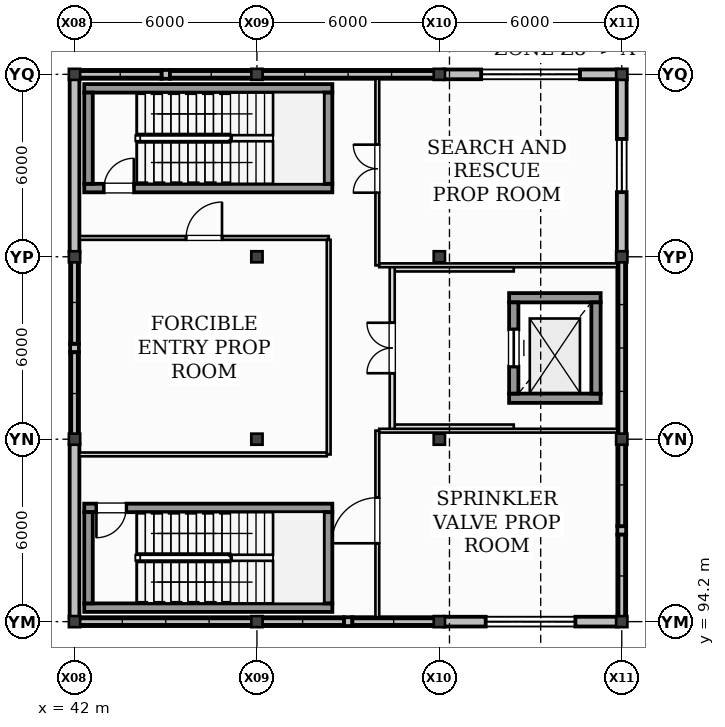
"""IFC4 building model, lengths in metres.
Left out: names, types, materials, properties, quantities, classifications, styles, units other than length and angle.
Written with IfcOpenShell. Run it as: python <this file> out.ifc"""

import sys

from ifc_helpers import new_model, si_unit, direction, frame, frame_2d, origin, origin_2d, place, context, subcontext, project, spatial, rectangle, i_section, extrude, element, fill, save


model = new_model("IFC4")
c1 = context("Model", 3, precision=1e-05, world=origin(), true_north=direction((0.0, 1.0)))
c2 = subcontext(c1, "Body", "Model", "MODEL_VIEW")
j1 = project(units=[si_unit("LENGTHUNIT", "METRE"), si_unit("PLANEANGLEUNIT", "RADIAN")], contexts=[c1])
p1 = place(None, origin())
s1 = spatial("IfcSite", under=j1, at=p1, CompositionType="ELEMENT")
p2 = place(p1, origin())
s2 = spatial("IfcBuilding", under=s1, at=p2, CompositionType="ELEMENT")
p3 = place(p2, frame((0.0, 0.0, 6.0)))
s3 = spatial("IfcBuildingStorey", under=s2, at=p3, CompositionType="ELEMENT", Elevation=6.0)
for number, where, z_axis, x_axis in (
    (1, (42.0, 94.2, 0.0), (0.0, 0.0, 1.0), (1.0, 0.0, 0.0)),
    (2, (42.0, 100.2, 0.0), (0.0, 0.0, 1.0), (1.0, 0.0, 0.0)),
    (3, (42.0, 106.2, 0.0), (0.0, 0.0, 1.0), (1.0, 0.0, 0.0)),
    (4, (42.0, 112.2, 0.0), (0.0, 0.0, 1.0), (1.0, 0.0, 0.0)),
    (5, (48.0, 94.2, 0.0), (0.0, 0.0, 1.0), (1.0, 0.0, 0.0)),
    (6, (48.0, 100.2, 0.0), (0.0, 0.0, 1.0), (1.0, 0.0, 0.0)),
    (7, (48.0, 106.2, 0.0), (0.0, 0.0, 1.0), (1.0, 0.0, 0.0)),
    (8, (48.0, 112.2, 0.0), (0.0, 0.0, 1.0), (1.0, 0.0, 0.0)),
    (9, (54.0, 94.2, 0.0), (0.0, 0.0, 1.0), (1.0, 0.0, 0.0)),
    (10, (54.0, 100.2, 0.0), (0.0, 0.0, 1.0), (1.0, 0.0, 0.0)),
    (11, (54.0, 106.2, 0.0), (0.0, 0.0, 1.0), (1.0, 0.0, 0.0)),
    (12, (54.0, 112.2, 0.0), (0.0, 0.0, 1.0), (1.0, 0.0, 0.0)),
    (13, (60.0, 94.2, 0.0), (0.0, 0.0, 1.0), (1.0, 0.0, 0.0)),
    (14, (60.0, 100.2, 0.0), (0.0, 0.0, 1.0), (1.0, 0.0, 0.0)),
    (15, (60.0, 106.2, 0.0), (0.0, 0.0, 1.0), (1.0, 0.0, 0.0)),
    (16, (60.0, 112.2, 0.0), (0.0, 0.0, 1.0), (1.0, 0.0, 0.0)),
):
    element("IfcColumn", number, at=place(p3, frame(where, z_axis=z_axis, x_axis=x_axis)), inside=s3, PredefinedType="COLUMN", context=c2, shape_type="SweptSolid", body=[
        extrude(i_section(OverallWidth=0.371, OverallDepth=0.364, WebThickness=0.013, FlangeThickness=0.022, at=origin_2d()), origin(), (0.0, 0.0, 1.0), 4.0),
    ])
p4 = place(p3, frame((42.145, 94.2, 0.0), z_axis=(0.0, 0.0, 1.0), x_axis=(1.0, 0.0, 0.0)))
e17 = element("IfcWall", 17, at=p4, inside=s3, PredefinedType="STANDARD", context=c2, shape_type="SweptSolid", body=[
    extrude(rectangle(XDim=5.71, YDim=0.29, at=frame_2d((2.855, 0.0))), origin(), (0.0, 0.0, 1.0), 0.8),
])
p5 = place(p3, frame((50.86, 94.2, 0.0), z_axis=(0.0, 0.0, 1.0), x_axis=(1.0, 0.0, 0.0)))
e18 = element("IfcWall", 18, at=p5, inside=s3, PredefinedType="STANDARD", context=c2, shape_type="SweptSolid", body=[
    extrude(rectangle(XDim=0.28, YDim=0.29, at=frame_2d((0.14, 0.0))), origin(), (0.0, 0.0, 1.0), 3.153),
])
p6 = place(p3, frame((48.145, 94.2, 0.0), z_axis=(0.0, 0.0, 1.0), x_axis=(1.0, 0.0, 0.0)))
e19 = element("IfcWall", 19, at=p6, inside=s3, PredefinedType="STANDARD", context=c2, shape_type="SweptSolid", body=[
    extrude(rectangle(XDim=2.715, YDim=0.29, at=frame_2d((1.357, 0.0))), origin(), (0.0, 0.0, 1.0), 0.92),
])
p7 = place(p3, frame((51.14, 94.2, 0.0), z_axis=(0.0, 0.0, 1.0), x_axis=(1.0, 0.0, 0.0)))
e20 = element("IfcWall", 20, at=p7, inside=s3, PredefinedType="STANDARD", context=c2, shape_type="SweptSolid", body=[
    extrude(rectangle(XDim=2.715, YDim=0.29, at=frame_2d((1.357, 0.0))), origin(), (0.0, 0.0, 1.0), 0.32),
])
p8 = place(p3, frame((54.145, 94.2, 0.0), z_axis=(0.0, 0.0, 1.0), x_axis=(1.0, 0.0, 0.0)))
e21 = element("IfcWall", 21, at=p8, inside=s3, PredefinedType="STANDARD", context=c2, shape_type="SweptSolid", body=[
    extrude(rectangle(XDim=5.71, YDim=0.32, at=frame_2d((2.855, 0.0))), origin(), (0.0, 0.0, 1.0), 3.153),
])
p9 = place(p8, frame((1.38, 0.0, 1.0)))
e22 = element("IfcOpeningElement", 22, at=p9, cuts=e21, PredefinedType="OPENING", context=c2, shape_type="SweptSolid", body=[
    extrude(rectangle(XDim=2.95, YDim=1.55, at=frame_2d((1.475, 0.775))), frame((0.0, 0.17, 0.0), z_axis=(0.0, -1.0, 0.0), x_axis=(1.0, 0.0, 0.0)), (0.0, 0.0, 1.0), 0.34),
])
p10 = place(p3, frame((45.14, 112.2, 0.0), z_axis=(0.0, 0.0, 1.0), x_axis=(-1.0, 0.0, 0.0)))
e23 = element("IfcWall", 23, at=p10, inside=s3, PredefinedType="STANDARD", context=c2, shape_type="SweptSolid", body=[
    extrude(rectangle(XDim=0.28, YDim=0.29, at=frame_2d((0.14, 0.0))), origin(), (0.0, 0.0, 1.0), 3.153),
])
p11 = place(p3, frame((47.855, 112.2, 0.0), z_axis=(0.0, 0.0, 1.0), x_axis=(-1.0, 0.0, 0.0)))
e24 = element("IfcWall", 24, at=p11, inside=s3, PredefinedType="STANDARD", context=c2, shape_type="SweptSolid", body=[
    extrude(rectangle(XDim=2.715, YDim=0.29, at=frame_2d((1.357, 0.0))), origin(), (0.0, 0.0, 1.0), 0.44),
])
p12 = place(p3, frame((44.86, 112.2, 0.0), z_axis=(0.0, 0.0, 1.0), x_axis=(-1.0, 0.0, 0.0)))
e25 = element("IfcWall", 25, at=p12, inside=s3, PredefinedType="STANDARD", context=c2, shape_type="SweptSolid", body=[
    extrude(rectangle(XDim=2.715, YDim=0.29, at=frame_2d((1.357, 0.0))), origin(), (0.0, 0.0, 1.0), 0.56),
])
p13 = place(p3, frame((53.855, 112.2, 0.0), z_axis=(0.0, 0.0, 1.0), x_axis=(-1.0, 0.0, 0.0)))
e26 = element("IfcWall", 26, at=p13, inside=s3, PredefinedType="STANDARD", context=c2, shape_type="SweptSolid", body=[
    extrude(rectangle(XDim=5.71, YDim=0.29, at=frame_2d((2.855, 0.0))), origin(), (0.0, 0.0, 1.0), 0.68),
])
p14 = place(p3, frame((59.855, 112.2, 0.0), z_axis=(0.0, 0.0, 1.0), x_axis=(-1.0, 0.0, 0.0)))
e27 = element("IfcWall", 27, at=p14, inside=s3, PredefinedType="STANDARD", context=c2, shape_type="SweptSolid", body=[
    extrude(rectangle(XDim=5.71, YDim=0.32, at=frame_2d((2.855, 0.0))), origin(), (0.0, 0.0, 1.0), 3.153),
])
p15 = place(p14, frame((1.23, 0.0, 1.0)))
e28 = element("IfcOpeningElement", 28, at=p15, cuts=e27, PredefinedType="OPENING", context=c2, shape_type="SweptSolid", body=[
    extrude(rectangle(XDim=3.25, YDim=1.55, at=frame_2d((1.625, 0.775))), frame((0.0, 0.17, 0.0), z_axis=(0.0, -1.0, 0.0), x_axis=(1.0, 0.0, 0.0)), (0.0, 0.0, 1.0), 0.34),
])
p16 = place(p3, frame((42.0, 100.055, 0.0), z_axis=(0.0, 0.0, 1.0), x_axis=(0.0, -1.0, 0.0)))
e29 = element("IfcWall", 29, at=p16, inside=s3, PredefinedType="STANDARD", context=c2, shape_type="SweptSolid", body=[
    extrude(rectangle(XDim=5.71, YDim=0.32, at=frame_2d((2.855, 0.0))), origin(), (0.0, 0.0, 1.0), 3.157),
])
p17 = place(p3, frame((42.0, 103.34, 0.0), z_axis=(0.0, 0.0, 1.0), x_axis=(0.0, -1.0, 0.0)))
e30 = element("IfcWall", 30, at=p17, inside=s3, PredefinedType="STANDARD", context=c2, shape_type="SweptSolid", body=[
    extrude(rectangle(XDim=0.28, YDim=0.29, at=frame_2d((0.14, 0.0))), origin(), (0.0, 0.0, 1.0), 3.157),
])
p18 = place(p3, frame((42.0, 106.055, 0.0), z_axis=(0.0, 0.0, 1.0), x_axis=(0.0, -1.0, 0.0)))
e31 = element("IfcWall", 31, at=p18, inside=s3, PredefinedType="STANDARD", context=c2, shape_type="SweptSolid", body=[
    extrude(rectangle(XDim=2.715, YDim=0.29, at=frame_2d((1.357, 0.0))), origin(), (0.0, 0.0, 1.0), 0.8),
])
p19 = place(p3, frame((42.0, 103.06, 0.0), z_axis=(0.0, 0.0, 1.0), x_axis=(0.0, -1.0, 0.0)))
e32 = element("IfcWall", 32, at=p19, inside=s3, PredefinedType="STANDARD", context=c2, shape_type="SweptSolid", body=[
    extrude(rectangle(XDim=2.715, YDim=0.29, at=frame_2d((1.357, 0.0))), origin(), (0.0, 0.0, 1.0), 0.92),
])
p20 = place(p3, frame((42.0, 112.055, 0.0), z_axis=(0.0, 0.0, 1.0), x_axis=(0.0, -1.0, 0.0)))
e33 = element("IfcWall", 33, at=p20, inside=s3, PredefinedType="STANDARD", context=c2, shape_type="SweptSolid", body=[
    extrude(rectangle(XDim=5.71, YDim=0.32, at=frame_2d((2.855, 0.0))), origin(), (0.0, 0.0, 1.0), 3.157),
])
p21 = place(p3, frame((60.0, 97.06, 0.0), z_axis=(0.0, 0.0, 1.0), x_axis=(0.0, 1.0, 0.0)))
e34 = element("IfcWall", 34, at=p21, inside=s3, PredefinedType="STANDARD", context=c2, shape_type="SweptSolid", body=[
    extrude(rectangle(XDim=0.28, YDim=0.29, at=frame_2d((0.14, 0.0))), origin(), (0.0, 0.0, 1.0), 3.157),
])
p22 = place(p3, frame((60.0, 94.345, 0.0), z_axis=(0.0, 0.0, 1.0), x_axis=(0.0, 1.0, 0.0)))
e35 = element("IfcWall", 35, at=p22, inside=s3, PredefinedType="STANDARD", context=c2, shape_type="SweptSolid", body=[
    extrude(rectangle(XDim=2.715, YDim=0.29, at=frame_2d((1.357, 0.0))), origin(), (0.0, 0.0, 1.0), 0.32),
])
p23 = place(p3, frame((60.0, 97.34, 0.0), z_axis=(0.0, 0.0, 1.0), x_axis=(0.0, 1.0, 0.0)))
e36 = element("IfcWall", 36, at=p23, inside=s3, PredefinedType="STANDARD", context=c2, shape_type="SweptSolid", body=[
    extrude(rectangle(XDim=2.715, YDim=0.29, at=frame_2d((1.357, 0.0))), origin(), (0.0, 0.0, 1.0), 0.44),
])
p24 = place(p3, frame((60.0, 100.345, 0.0), z_axis=(0.0, 0.0, 1.0), x_axis=(0.0, 1.0, 0.0)))
e37 = element("IfcWall", 37, at=p24, inside=s3, PredefinedType="STANDARD", context=c2, shape_type="SweptSolid", body=[
    extrude(rectangle(XDim=5.71, YDim=0.29, at=frame_2d((2.855, 0.0))), origin(), (0.0, 0.0, 1.0), 0.56),
])
p25 = place(p3, frame((60.0, 106.345, 0.0), z_axis=(0.0, 0.0, 1.0), x_axis=(0.0, 1.0, 0.0)))
e38 = element("IfcWall", 38, at=p25, inside=s3, PredefinedType="STANDARD", context=c2, shape_type="SweptSolid", body=[
    extrude(rectangle(XDim=5.71, YDim=0.32, at=frame_2d((2.855, 0.0))), origin(), (0.0, 0.0, 1.0), 3.157),
])
p26 = place(p25, frame((1.98, 0.0, 0.85)))
e39 = element("IfcOpeningElement", 39, at=p26, cuts=e38, PredefinedType="OPENING", context=c2, shape_type="SweptSolid", body=[
    extrude(rectangle(XDim=1.75, YDim=1.75, at=frame_2d((0.875, 0.875))), frame((0.0, 0.17, 0.0), z_axis=(0.0, -1.0, 0.0), x_axis=(1.0, 0.0, 0.0)), (0.0, 0.0, 1.0), 0.34),
])
p27 = place(p3, frame((42.32, 94.66, 0.0), z_axis=(0.0, 0.0, 1.0), x_axis=(1.0, 0.0, 0.0)))
e40 = element("IfcWall", 40, at=p27, inside=s3, PredefinedType="SHEAR", context=c2, shape_type="SweptSolid", body=[
    extrude(rectangle(XDim=8.16, YDim=0.28, at=frame_2d((4.08, 0.0))), origin(), (0.0, 0.0, 1.0), 4.0),
])
p28 = place(p3, frame((50.48, 97.94, 0.0), z_axis=(0.0, 0.0, 1.0), x_axis=(-1.0, 0.0, 0.0)))
e41 = element("IfcWall", 41, at=p28, inside=s3, PredefinedType="SHEAR", context=c2, shape_type="SweptSolid", body=[
    extrude(rectangle(XDim=8.16, YDim=0.28, at=frame_2d((4.08, 0.0))), origin(), (0.0, 0.0, 1.0), 4.0),
])
p29 = place(p28, frame((6.78, 0.0, 0.0)))
e42 = element("IfcOpeningElement", 42, at=p29, cuts=e41, PredefinedType="OPENING", context=c2, shape_type="SweptSolid", body=[
    extrude(rectangle(XDim=0.98, YDim=2.15, at=frame_2d((0.49, 1.075))), frame((0.0, 0.15, 0.0), z_axis=(0.0, -1.0, 0.0), x_axis=(1.0, 0.0, 0.0)), (0.0, 0.0, 1.0), 0.3),
])
for number, where, z_axis, x_axis in (
    (43, (42.46, 97.8, 0.0), (0.0, 0.0, 1.0), (0.0, -1.0, 0.0)),
    (44, (50.34, 94.8, 0.0), (0.0, 0.0, 1.0), (0.0, 1.0, 0.0)),
):
    element("IfcWall", number, at=place(p3, frame(where, z_axis=z_axis, x_axis=x_axis)), inside=s3, PredefinedType="SHEAR", context=c2, shape_type="SweptSolid", body=[
        extrude(rectangle(XDim=3.0, YDim=0.28, at=frame_2d((1.5, 0.0))), origin(), (0.0, 0.0, 1.0), 4.0),
    ])
p30 = place(p3, frame((42.32, 108.46, 0.0), z_axis=(0.0, 0.0, 1.0), x_axis=(1.0, 0.0, 0.0)))
e45 = element("IfcWall", 45, at=p30, inside=s3, PredefinedType="SHEAR", context=c2, shape_type="SweptSolid", body=[
    extrude(rectangle(XDim=8.16, YDim=0.28, at=frame_2d((4.08, 0.0))), origin(), (0.0, 0.0, 1.0), 4.0),
])
p31 = place(p30, frame((0.65, 0.0, 0.0)))
e46 = element("IfcOpeningElement", 46, at=p31, cuts=e45, PredefinedType="OPENING", context=c2, shape_type="SweptSolid", body=[
    extrude(rectangle(XDim=0.98, YDim=2.15, at=frame_2d((0.49, 1.075))), frame((0.0, 0.15, 0.0), z_axis=(0.0, -1.0, 0.0), x_axis=(1.0, 0.0, 0.0)), (0.0, 0.0, 1.0), 0.3),
])
p32 = place(p3, frame((50.48, 111.74, 0.0), z_axis=(0.0, 0.0, 1.0), x_axis=(-1.0, 0.0, 0.0)))
e47 = element("IfcWall", 47, at=p32, inside=s3, PredefinedType="SHEAR", context=c2, shape_type="SweptSolid", body=[
    extrude(rectangle(XDim=8.16, YDim=0.28, at=frame_2d((4.08, 0.0))), origin(), (0.0, 0.0, 1.0), 4.0),
])
for number, where, z_axis, x_axis in (
    (48, (42.46, 111.6, 0.0), (0.0, 0.0, 1.0), (0.0, -1.0, 0.0)),
    (49, (50.34, 108.6, 0.0), (0.0, 0.0, 1.0), (0.0, 1.0, 0.0)),
):
    element("IfcWall", number, at=place(p3, frame(where, z_axis=z_axis, x_axis=x_axis)), inside=s3, PredefinedType="SHEAR", context=c2, shape_type="SweptSolid", body=[
        extrude(rectangle(XDim=3.0, YDim=0.28, at=frame_2d((1.5, 0.0))), origin(), (0.0, 0.0, 1.0), 4.0),
    ])
for number, where, z_axis, x_axis in (
    (50, (56.295, 101.548, 0.0), (0.0, 0.0, 1.0), (1.0, 0.0, 0.0)),
    (51, (59.305, 104.853, 0.0), (0.0, 0.0, 1.0), (-1.0, 0.0, 0.0)),
):
    element("IfcWall", number, at=place(p3, frame(where, z_axis=z_axis, x_axis=x_axis)), inside=s3, PredefinedType="SHEAR", context=c2, shape_type="SweptSolid", body=[
        extrude(rectangle(XDim=3.01, YDim=0.305, at=frame_2d((1.505, 0.0))), origin(), (0.0, 0.0, 1.0), 4.0),
    ])
p33 = place(p3, frame((56.448, 104.7, 0.0), z_axis=(0.0, 0.0, 1.0), x_axis=(0.0, -1.0, 0.0)))
e52 = element("IfcWall", 52, at=p33, inside=s3, PredefinedType="SHEAR", context=c2, shape_type="SweptSolid", body=[
    extrude(rectangle(XDim=3.0, YDim=0.305, at=frame_2d((1.5, 0.0))), origin(), (0.0, 0.0, 1.0), 4.0),
])
p34 = place(p33, frame((0.89, 0.0, 0.0)))
e53 = element("IfcOpeningElement", 53, at=p34, cuts=e52, PredefinedType="OPENING", context=c2, shape_type="SweptSolid", body=[
    extrude(rectangle(XDim=1.22, YDim=2.22, at=frame_2d((0.61, 1.11))), frame((0.0, 0.162, 0.0), z_axis=(0.0, -1.0, 0.0), x_axis=(1.0, 0.0, 0.0)), (0.0, 0.0, 1.0), 0.325),
])
p35 = place(p3, frame((59.153, 101.7, 0.0), z_axis=(0.0, 0.0, 1.0), x_axis=(0.0, 1.0, 0.0)))
e54 = element("IfcWall", 54, at=p35, inside=s3, PredefinedType="SHEAR", context=c2, shape_type="SweptSolid", body=[
    extrude(rectangle(XDim=3.0, YDim=0.305, at=frame_2d((1.5, 0.0))), origin(), (0.0, 0.0, 1.0), 4.0),
])
for number, where, z_axis, x_axis in (
    (55, (52.45, 100.6, 0.0), (0.0, 0.0, 1.0), (1.0, 0.0, 0.0)),
    (56, (56.448, 105.8, 0.0), (0.0, 0.0, 1.0), (-1.0, 0.0, 0.0)),
):
    element("IfcWall", number, at=place(p3, frame(where, z_axis=z_axis, x_axis=x_axis)), inside=s3, PredefinedType="PARTITIONING", context=c2, shape_type="SweptSolid", body=[
        extrude(rectangle(XDim=3.998, YDim=0.165, at=frame_2d((1.999, 0.0))), origin(), (0.0, 0.0, 1.0), 3.72),
    ])
p36 = place(p3, frame((52.45, 100.52, 0.0), z_axis=(0.0, 0.0, 1.0), x_axis=(0.0, 1.0, 0.0)))
e57 = element("IfcWall", 57, at=p36, inside=s3, PredefinedType="PARTITIONING", context=c2, shape_type="SweptSolid", body=[
    extrude(rectangle(XDim=5.36, YDim=0.165, at=frame_2d((2.68, 0.0))), origin(), (0.0, 0.0, 1.0), 3.72),
])
p37 = place(p36, frame((1.85, 0.0, 0.0)))
e58 = element("IfcOpeningElement", 58, at=p37, cuts=e57, PredefinedType="OPENING", context=c2, shape_type="SweptSolid", body=[
    extrude(rectangle(XDim=1.66, YDim=2.2, at=frame_2d((0.83, 1.1))), frame((0.0, 0.093, 0.0), z_axis=(0.0, -1.0, 0.0), x_axis=(1.0, 0.0, 0.0)), (0.0, 0.0, 1.0), 0.185),
])
p38 = place(p3, frame((42.16, 106.82, 0.0), z_axis=(0.0, 0.0, 1.0), x_axis=(1.0, 0.0, 0.0)))
e59 = element("IfcWall", 59, at=p38, inside=s3, PredefinedType="PARTITIONING", context=c2, shape_type="SweptSolid", body=[
    extrude(rectangle(XDim=8.203, YDim=0.125, at=frame_2d((4.101, 0.0))), origin(), (0.0, 0.0, 1.0), 3.72),
])
p39 = place(p38, frame((3.511, 0.0, 0.0)))
e60 = element("IfcOpeningElement", 60, at=p39, cuts=e59, PredefinedType="OPENING", context=c2, shape_type="SweptSolid", body=[
    extrude(rectangle(XDim=1.18, YDim=2.16, at=frame_2d((0.59, 1.08))), frame((0.0, 0.073, 0.0), z_axis=(0.0, -1.0, 0.0), x_axis=(1.0, 0.0, 0.0)), (0.0, 0.0, 1.0), 0.145),
])
p40 = place(p3, frame((50.36, 106.758, 0.0), z_axis=(0.0, 0.0, 1.0), x_axis=(0.0, -1.0, 0.0)))
e61 = element("IfcWall", 61, at=p40, inside=s3, PredefinedType="PARTITIONING", context=c2, shape_type="SweptSolid", body=[
    extrude(rectangle(XDim=7.06, YDim=0.125, at=frame_2d((3.53, 0.0))), origin(), (0.0, 0.0, 1.0), 3.72),
])
p41 = place(p3, frame((50.298, 99.7, 0.0), z_axis=(0.0, 0.0, 1.0), x_axis=(-1.0, 0.0, 0.0)))
e62 = element("IfcWall", 62, at=p41, inside=s3, PredefinedType="PARTITIONING", context=c2, shape_type="SweptSolid", body=[
    extrude(rectangle(XDim=8.138, YDim=0.125, at=frame_2d((4.069, 0.0))), origin(), (0.0, 0.0, 1.0), 3.72),
])
p42 = place(p3, frame((51.96, 94.345, 0.0), z_axis=(0.0, 0.0, 1.0), x_axis=(0.0, 1.0, 0.0)))
e63 = element("IfcWall", 63, at=p42, inside=s3, PredefinedType="PARTITIONING", context=c2, shape_type="SweptSolid", body=[
    extrude(rectangle(XDim=6.137, YDim=0.125, at=frame_2d((3.069, 0.0))), origin(), (0.0, 0.0, 1.0), 3.43),
])
p43 = place(p42, frame((2.432, 0.0, 0.0)))
e64 = element("IfcOpeningElement", 64, at=p43, cuts=e63, PredefinedType="OPENING", context=c2, shape_type="SweptSolid", body=[
    extrude(rectangle(XDim=1.5, YDim=2.22, at=frame_2d((0.75, 1.11))), frame((0.0, 0.073, 0.0), z_axis=(0.0, -1.0, 0.0), x_axis=(1.0, 0.0, 0.0)), (0.0, 0.0, 1.0), 0.145),
])
p44 = place(p3, frame((52.022, 100.48, 0.0), z_axis=(0.0, 0.0, 1.0), x_axis=(1.0, 0.0, 0.0)))
e65 = element("IfcWall", 65, at=p44, inside=s3, PredefinedType="PARTITIONING", context=c2, shape_type="SweptSolid", body=[
    extrude(rectangle(XDim=7.833, YDim=0.125, at=frame_2d((3.916, 0.0))), origin(), (0.0, 0.0, 1.0), 3.153),
])
p45 = place(p3, frame((51.96, 105.917, 0.0), z_axis=(0.0, 0.0, 1.0), x_axis=(0.0, 1.0, 0.0)))
e66 = element("IfcWall", 66, at=p45, inside=s3, PredefinedType="PARTITIONING", context=c2, shape_type="SweptSolid", body=[
    extrude(rectangle(XDim=6.137, YDim=0.125, at=frame_2d((3.069, 0.0))), origin(), (0.0, 0.0, 1.0), 3.43),
])
p46 = place(p45, frame((2.39, 0.0, 0.0)))
e67 = element("IfcOpeningElement", 67, at=p46, cuts=e66, PredefinedType="OPENING", context=c2, shape_type="SweptSolid", body=[
    extrude(rectangle(XDim=1.58, YDim=2.2, at=frame_2d((0.79, 1.1))), frame((0.0, 0.073, 0.0), z_axis=(0.0, -1.0, 0.0), x_axis=(1.0, 0.0, 0.0)), (0.0, 0.0, 1.0), 0.145),
])
p47 = place(p3, frame((59.855, 105.92, 0.0), z_axis=(0.0, 0.0, 1.0), x_axis=(-1.0, 0.0, 0.0)))
e68 = element("IfcWall", 68, at=p47, inside=s3, PredefinedType="PARTITIONING", context=c2, shape_type="SweptSolid", body=[
    extrude(rectangle(XDim=7.833, YDim=0.125, at=frame_2d((3.916, 0.0))), origin(), (0.0, 0.0, 1.0), 3.153),
])
p48 = place(p9, origin())
e69 = element("IfcWindow", 69, at=p48, inside=s3, PartitioningType="SINGLE_PANEL", PredefinedType="WINDOW", context=c2, shape_type="SweptSolid", body=[
    extrude(rectangle(XDim=2.95, YDim=1.55, at=frame_2d((1.475, 0.775))), frame((0.0, 0.03, 0.0), z_axis=(0.0, -1.0, 0.0), x_axis=(1.0, 0.0, 0.0)), (0.0, 0.0, 1.0), 0.06),
])
fill(e22, e69)
p49 = place(p15, origin())
e70 = element("IfcWindow", 70, at=p49, inside=s3, PartitioningType="SINGLE_PANEL", PredefinedType="WINDOW", context=c2, shape_type="SweptSolid", body=[
    extrude(rectangle(XDim=3.25, YDim=1.55, at=frame_2d((1.625, 0.775))), frame((0.0, 0.03, 0.0), z_axis=(0.0, -1.0, 0.0), x_axis=(1.0, 0.0, 0.0)), (0.0, 0.0, 1.0), 0.06),
])
fill(e28, e70)
p50 = place(p26, origin())
e71 = element("IfcWindow", 71, at=p50, inside=s3, PartitioningType="SINGLE_PANEL", PredefinedType="WINDOW", context=c2, shape_type="SweptSolid", body=[
    extrude(rectangle(XDim=1.75, YDim=1.75, at=frame_2d((0.875, 0.875))), frame((0.0, 0.03, 0.0), z_axis=(0.0, -1.0, 0.0), x_axis=(1.0, 0.0, 0.0)), (0.0, 0.0, 1.0), 0.06),
])
fill(e39, e71)
p51 = place(p29, origin())
e72 = element("IfcDoor", 72, at=p51, inside=s3, OperationType="SINGLE_SWING_RIGHT", PredefinedType="DOOR", context=c2, shape_type="SweptSolid", body=[
    extrude(rectangle(XDim=0.98, YDim=2.15, at=frame_2d((0.49, 1.075))), frame((0.0, 0.025, 0.0), z_axis=(0.0, -1.0, 0.0), x_axis=(1.0, 0.0, 0.0)), (0.0, 0.0, 1.0), 0.05),
])
fill(e42, e72)
p52 = place(p31, origin())
e73 = element("IfcDoor", 73, at=p52, inside=s3, OperationType="SINGLE_SWING_RIGHT", PredefinedType="DOOR", context=c2, shape_type="SweptSolid", body=[
    extrude(rectangle(XDim=0.98, YDim=2.15, at=frame_2d((0.49, 1.075))), frame((0.0, 0.025, 0.0), z_axis=(0.0, -1.0, 0.0), x_axis=(1.0, 0.0, 0.0)), (0.0, 0.0, 1.0), 0.05),
])
fill(e46, e73)
p53 = place(p34, origin())
e74 = element("IfcDoor", 74, at=p53, inside=s3, OperationType="SLIDING_TO_LEFT", PredefinedType="DOOR", context=c2, shape_type="SweptSolid", body=[
    extrude(rectangle(XDim=1.22, YDim=2.22, at=frame_2d((0.61, 1.11))), frame((0.0, 0.025, 0.0), z_axis=(0.0, -1.0, 0.0), x_axis=(1.0, 0.0, 0.0)), (0.0, 0.0, 1.0), 0.05),
])
fill(e53, e74)
p54 = place(p37, frame((1.66, 0.0, 0.0), z_axis=(0.0, 0.0, 1.0), x_axis=(-1.0, 0.0, 0.0)))
e75 = element("IfcDoor", 75, at=p54, inside=s3, OperationType="DOUBLE_DOOR_SINGLE_SWING", PredefinedType="DOOR", context=c2, shape_type="SweptSolid", body=[
    extrude(rectangle(XDim=1.66, YDim=2.2, at=frame_2d((0.83, 1.1))), frame((0.0, 0.025, 0.0), z_axis=(0.0, -1.0, 0.0), x_axis=(1.0, 0.0, 0.0)), (0.0, 0.0, 1.0), 0.05),
])
fill(e58, e75)
p55 = place(p39, frame((1.18, 0.0, 0.0), z_axis=(0.0, 0.0, 1.0), x_axis=(-1.0, 0.0, 0.0)))
e76 = element("IfcDoor", 76, at=p55, inside=s3, OperationType="SINGLE_SWING_RIGHT", PredefinedType="DOOR", context=c2, shape_type="SweptSolid", body=[
    extrude(rectangle(XDim=1.18, YDim=2.16, at=frame_2d((0.59, 1.08))), frame((0.0, 0.025, 0.0), z_axis=(0.0, -1.0, 0.0), x_axis=(1.0, 0.0, 0.0)), (0.0, 0.0, 1.0), 0.05),
])
fill(e60, e76)
p56 = place(p43, frame((1.5, 0.0, 0.0), z_axis=(0.0, 0.0, 1.0), x_axis=(-1.0, 0.0, 0.0)))
e77 = element("IfcDoor", 77, at=p56, inside=s3, OperationType="SINGLE_SWING_LEFT", PredefinedType="DOOR", context=c2, shape_type="SweptSolid", body=[
    extrude(rectangle(XDim=1.5, YDim=2.22, at=frame_2d((0.75, 1.11))), frame((0.0, 0.025, 0.0), z_axis=(0.0, -1.0, 0.0), x_axis=(1.0, 0.0, 0.0)), (0.0, 0.0, 1.0), 0.05),
])
fill(e64, e77)
p57 = place(p46, frame((1.58, 0.0, 0.0), z_axis=(0.0, 0.0, 1.0), x_axis=(-1.0, 0.0, 0.0)))
e78 = element("IfcDoor", 78, at=p57, inside=s3, OperationType="DOUBLE_DOOR_SINGLE_SWING", PredefinedType="DOOR", context=c2, shape_type="SweptSolid", body=[
    extrude(rectangle(XDim=1.58, YDim=2.2, at=frame_2d((0.79, 1.1))), frame((0.0, 0.025, 0.0), z_axis=(0.0, -1.0, 0.0), x_axis=(1.0, 0.0, 0.0)), (0.0, 0.0, 1.0), 0.05),
])
fill(e67, e78)
save(model, sys.argv[1])
